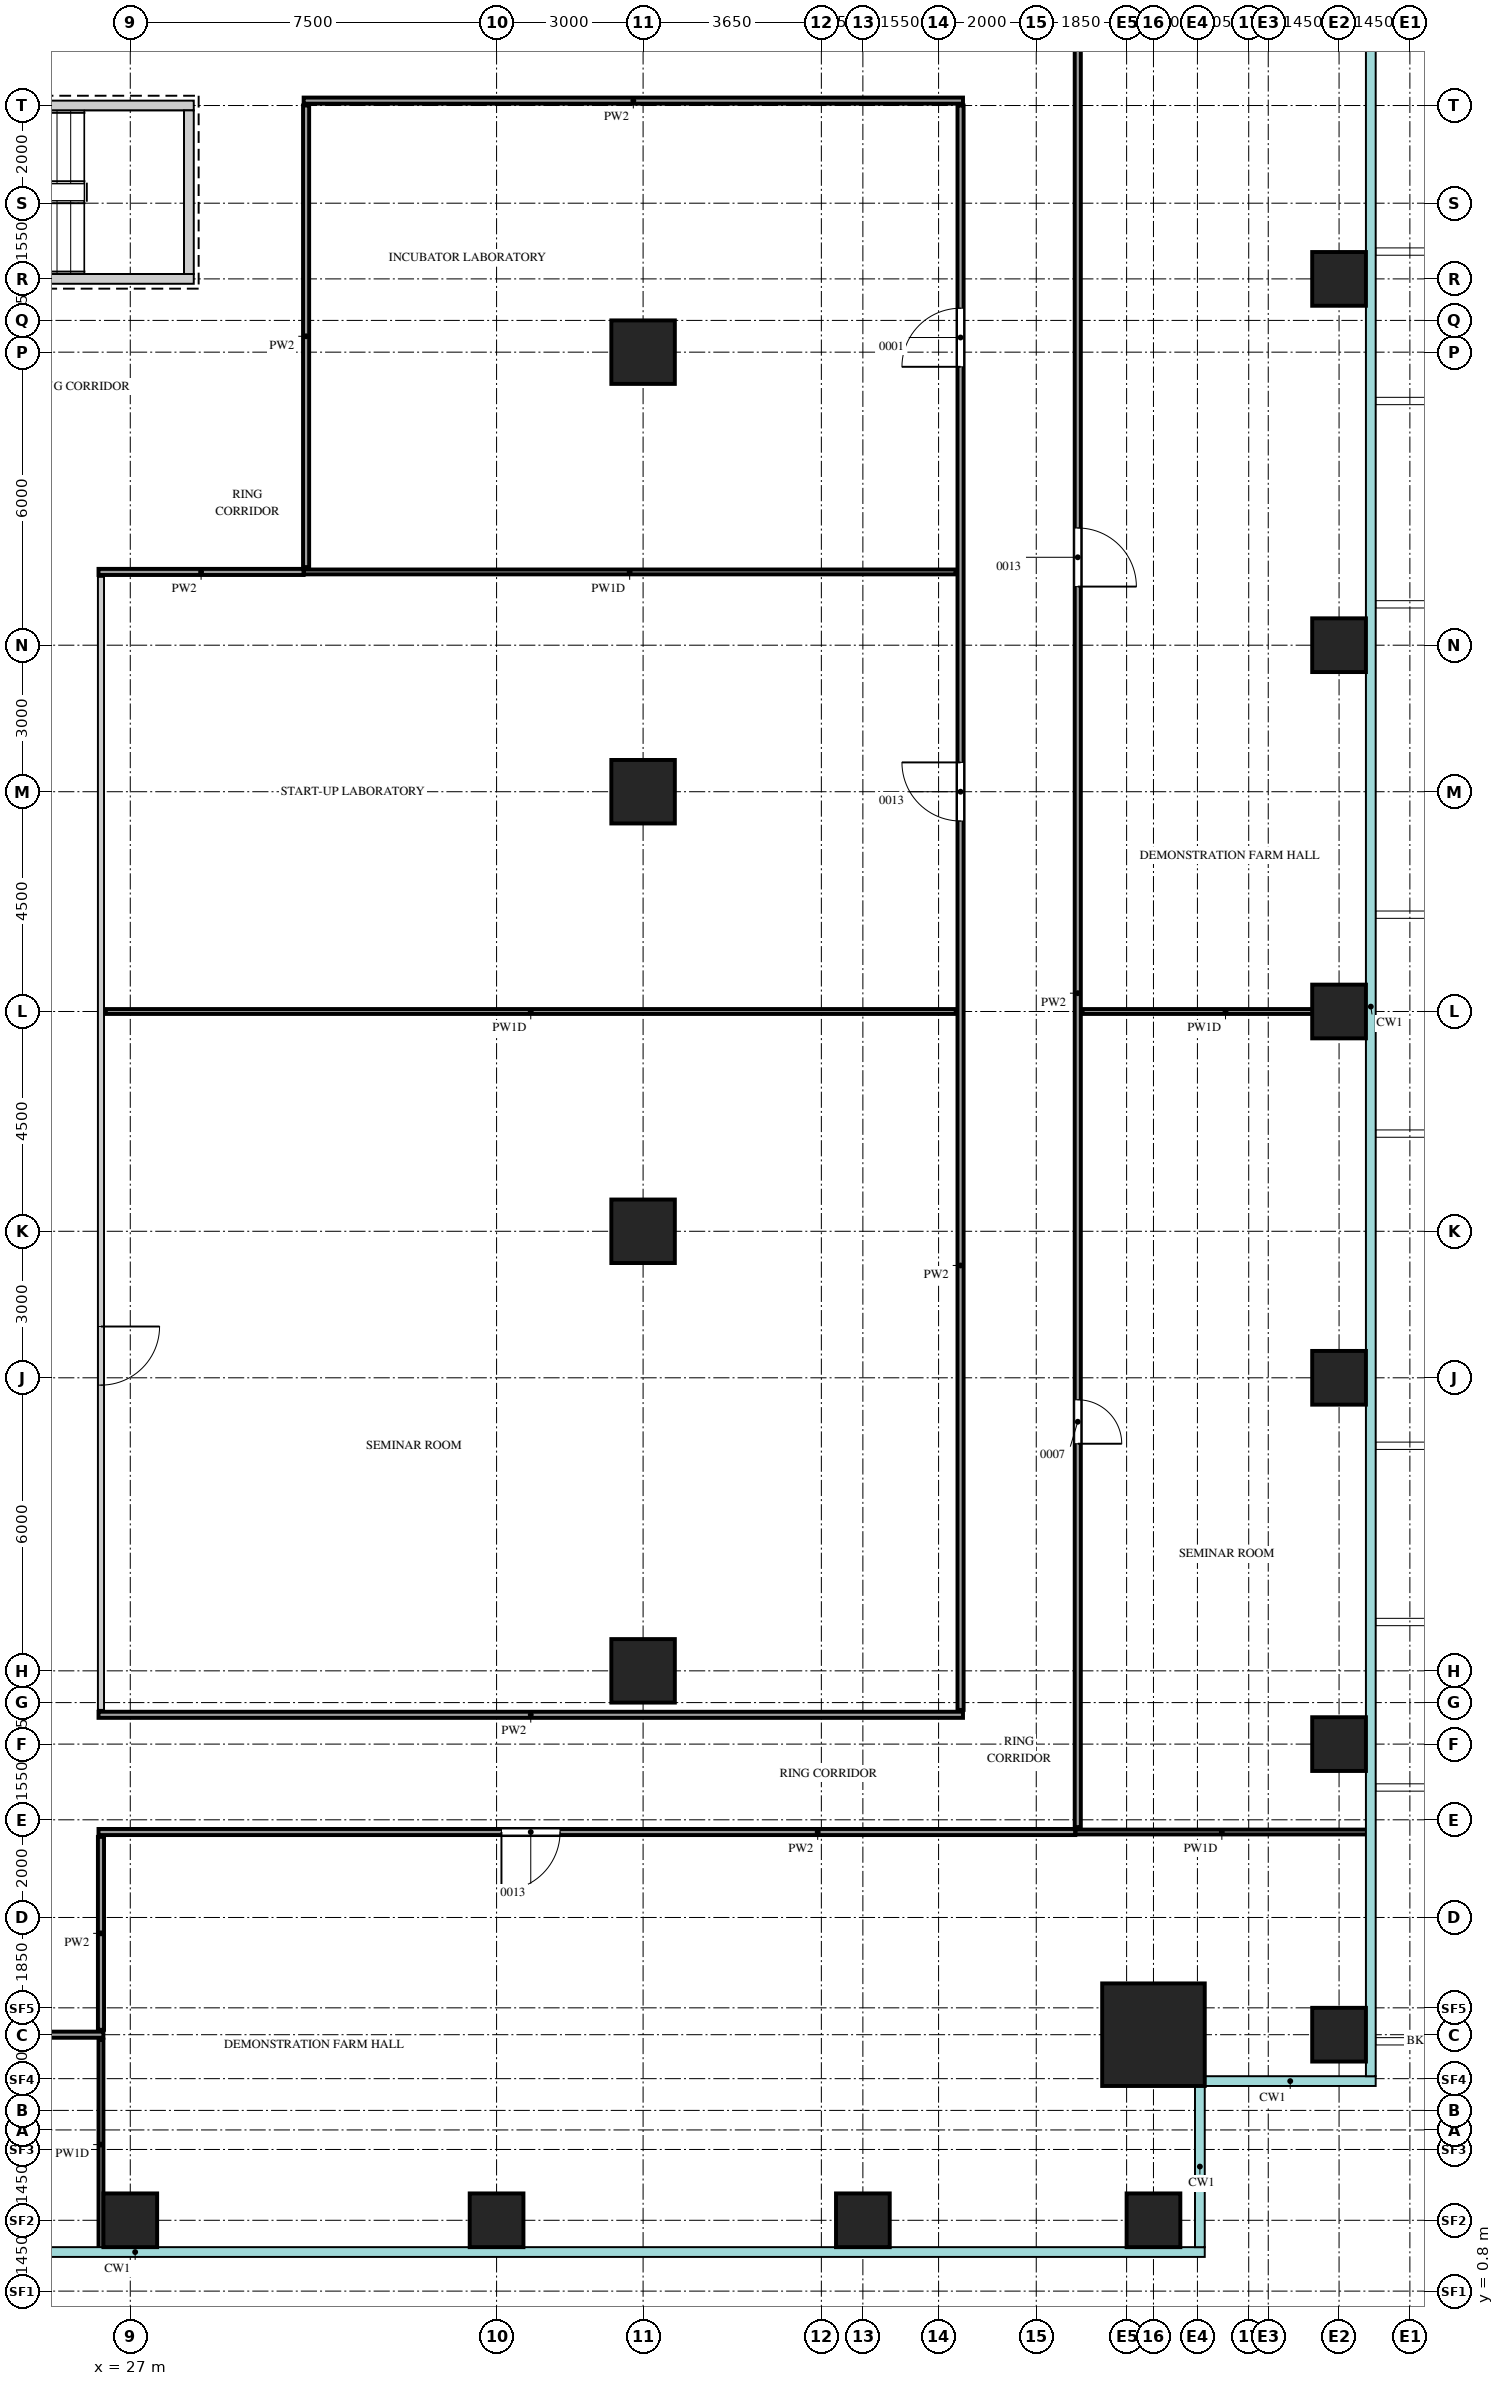
"""IFC4 building model, lengths in metres.
Left out: names, types, materials, properties, quantities, classifications, styles, units other than length and angle.
Written with IfcOpenShell. Run it as: python <this file> out.ifc"""

import sys

from ifc_helpers import new_model, si_unit, direction, frame, frame_2d, origin, origin_2d, place, context, subcontext, project, spatial, rectangle, extrude, source, transform, mapped, element, fill, save


model = new_model("IFC4")
c1 = context("Model", 3, precision=1e-05, world=origin(), true_north=direction((0.0, 1.0)))
c2 = subcontext(c1, "Body", "Model", "MODEL_VIEW")
j1 = project(units=[si_unit("LENGTHUNIT", "METRE"), si_unit("PLANEANGLEUNIT", "RADIAN")], contexts=[c1])
p1 = place(None, origin())
s1 = spatial("IfcSite", under=j1, at=p1, CompositionType="ELEMENT")
p2 = place(p1, origin())
s2 = spatial("IfcBuilding", under=s1, at=p2, CompositionType="ELEMENT")
p3 = place(p2, frame((0.0, 0.0, 149.9)))
s3 = spatial("IfcBuildingStorey", under=s2, at=p3, CompositionType="ELEMENT", Elevation=149.9)
m1 = source(origin(), c2, "Body", "SweptSolid", [
    extrude(rectangle(XDim=7.1, YDim=0.2, at=frame_2d((3.55, 0.0))), origin(), (0.0, 0.0, 1.0), 4.1),
])
p4 = place(p3, frame((21.2, 45.55, 0.0), z_axis=(0.0, 0.0, 1.0), x_axis=(1.0, 0.0, 0.0)))
e1 = element("IfcWall", 1, at=p4, inside=s3, PredefinedType="SHEAR", context=c2, shape_type="MappedRepresentation", body=[
    mapped(m1, transform((0.0, 0.0, 0.0))),
])
m2 = source(origin(), c2, "Body", "SweptSolid", [
    extrude(rectangle(XDim=1.2, YDim=2.1, at=frame_2d((0.6, 1.05))), frame((0.0, 0.11, 0.0), z_axis=(0.0, -1.0, 0.0), x_axis=(1.0, 0.0, 0.0)), (0.0, 0.0, 1.0), 0.22),
])
p5 = place(p4, frame((0.15, 0.0, 0.0)))
e2 = element("IfcOpeningElement", 2, at=p5, cuts=e1, PredefinedType="OPENING", context=c2, shape_type="MappedRepresentation", body=[
    mapped(m2, transform((0.0, 0.0, 0.0))),
])
p6 = place(p3, frame((21.2, 42.0, 0.0), z_axis=(0.0, 0.0, 1.0), x_axis=(1.0, 0.0, 0.0)))
e3 = element("IfcWall", 3, at=p6, inside=s3, PredefinedType="SHEAR", context=c2, shape_type="MappedRepresentation", body=[
    mapped(m1, transform((0.0, 0.0, 0.0))),
])
m3 = source(origin(), c2, "Body", "SweptSolid", [
    extrude(rectangle(XDim=3.35, YDim=0.2, at=frame_2d((1.675, 0.0))), origin(), (0.0, 0.0, 1.0), 4.1),
])
p7 = place(p3, frame((28.2, 42.1, 0.0), z_axis=(0.0, 0.0, 1.0), x_axis=(0.0, 1.0, 0.0)))
e4 = element("IfcWall", 4, at=p7, inside=s3, PredefinedType="SHEAR", context=c2, shape_type="MappedRepresentation", body=[
    mapped(m3, transform((0.0, 0.0, 0.0))),
])
m4 = source(origin(), c2, "Body", "SweptSolid", [
    extrude(rectangle(XDim=2.1, YDim=2.1, at=origin_2d()), origin(), (0.0, 0.0, 1.0), 4.4),
])
p8 = place(p3, frame((47.95, 6.05, 0.0), z_axis=(0.0, 0.0, 1.0), x_axis=(1.0, 0.0, 0.0)))
e5 = element("IfcColumn", 5, at=p8, inside=s3, PredefinedType="COLUMN", context=c2, shape_type="MappedRepresentation", body=[
    mapped(m4, transform((0.0, 0.0, 0.0))),
])
m5 = source(origin(), c2, "Body", "SweptSolid", [
    extrude(rectangle(XDim=1.1, YDim=1.1, at=origin_2d()), origin(), (0.0, 0.0, 1.0), 4.1),
])
for number, where, z_axis, x_axis in (
    (6, (27.0, 2.25, 0.0), (0.0, 0.0, 1.0), (1.0, 0.0, 0.0)),
    (7, (34.5, 2.25, 0.0), (0.0, 0.0, 1.0), (1.0, 0.0, 0.0)),
    (8, (42.0, 2.25, 0.0), (0.0, 0.0, 1.0), (1.0, 0.0, 0.0)),
    (9, (47.95, 2.25, 0.0), (0.0, 0.0, 1.0), (1.0, 0.0, 0.0)),
    (10, (51.75, 6.05, 0.0), (0.0, 0.0, 1.0), (1.0, 0.0, 0.0)),
    (11, (51.75, 12.0, 0.0), (0.0, 0.0, 1.0), (1.0, 0.0, 0.0)),
    (12, (51.75, 19.5, 0.0), (0.0, 0.0, 1.0), (1.0, 0.0, 0.0)),
    (13, (51.75, 27.0, 0.0), (0.0, 0.0, 1.0), (1.0, 0.0, 0.0)),
    (14, (51.75, 34.5, 0.0), (0.0, 0.0, 1.0), (1.0, 0.0, 0.0)),
    (15, (51.75, 42.0, 0.0), (0.0, 0.0, 1.0), (1.0, 0.0, 0.0)),
):
    element("IfcColumn", number, at=place(p3, frame(where, z_axis=z_axis, x_axis=x_axis)), inside=s3, PredefinedType="COLUMN", context=c2, shape_type="MappedRepresentation", body=[
        mapped(m5, transform((0.0, 0.0, 0.0))),
    ])
m6 = source(origin(), c2, "Body", "SweptSolid", [
    extrude(rectangle(XDim=1.3, YDim=1.3, at=origin_2d()), origin(), (0.0, 0.0, 1.0), 4.1),
])
for number, where, z_axis, x_axis in (
    (16, (37.5, 13.5, 0.0), (0.0, 0.0, 1.0), (1.0, 0.0, 0.0)),
    (17, (37.5, 22.5, 0.0), (0.0, 0.0, 1.0), (1.0, 0.0, 0.0)),
    (18, (37.5, 31.5, 0.0), (0.0, 0.0, 1.0), (1.0, 0.0, 0.0)),
    (19, (37.5, 40.5, 0.0), (0.0, 0.0, 1.0), (1.0, 0.0, 0.0)),
):
    element("IfcColumn", number, at=place(p3, frame(where, z_axis=z_axis, x_axis=x_axis)), inside=s3, PredefinedType="COLUMN", context=c2, shape_type="MappedRepresentation", body=[
        mapped(m6, transform((0.0, 0.0, 0.0))),
    ])
m7 = source(origin(), c2, "Body", "SweptSolid", [
    extrude(rectangle(XDim=4.3, YDim=0.1, at=frame_2d((2.15, 0.0))), origin(), (0.0, 0.0, 1.0), 4.2),
])
p9 = place(p3, frame((26.4, 1.65, 0.0), z_axis=(0.0, 0.0, 1.0), x_axis=(0.0, 1.0, 0.0)))
e20 = element("IfcWall", 20, at=p9, inside=s3, PredefinedType="PARTITIONING", context=c2, shape_type="MappedRepresentation", body=[
    mapped(m7, transform((0.0, 0.0, 0.0))),
])
m8 = source(origin(), c2, "Body", "SweptSolid", [
    extrude(rectangle(XDim=22.3, YDim=0.125, at=frame_2d((11.15, 0.0))), origin(), (0.0, 0.0, 1.0), 3.55),
])
p10 = place(p3, frame((4.15, 6.05, 0.0), z_axis=(0.0, 0.0, 1.0), x_axis=(1.0, 0.0, 0.0)))
e21 = element("IfcWall", 21, at=p10, inside=s3, PredefinedType="PARTITIONING", context=c2, shape_type="MappedRepresentation", body=[
    mapped(m8, transform((0.0, 0.0, 0.0))),
])
m9 = source(origin(), c2, "Body", "SweptSolid", [
    extrude(rectangle(XDim=0.9, YDim=2.1, at=frame_2d((0.45, 1.05))), frame((0.0, 0.073, 0.0), z_axis=(0.0, -1.0, 0.0), x_axis=(1.0, 0.0, 0.0)), (0.0, 0.0, 1.0), 0.145),
])
p11 = place(p10, frame((3.5, 0.0, 0.0)))
e22 = element("IfcOpeningElement", 22, at=p11, cuts=e21, PredefinedType="OPENING", context=c2, shape_type="MappedRepresentation", body=[
    mapped(m9, transform((0.0, 0.0, 0.0))),
])
p12 = place(p10, frame((14.6, 0.0, 0.0)))
e23 = element("IfcOpeningElement", 23, at=p12, cuts=e21, PredefinedType="OPENING", context=c2, shape_type="MappedRepresentation", body=[
    mapped(m9, transform((0.0, 0.0, 0.0))),
])
m10 = source(origin(), c2, "Body", "SweptSolid", [
    extrude(rectangle(XDim=3.95, YDim=0.125, at=frame_2d((1.975, 0.0))), origin(), (0.0, 0.0, 1.0), 4.2),
])
p13 = place(p3, frame((26.4, 6.15, 0.0), z_axis=(0.0, 0.0, 1.0), x_axis=(0.0, 1.0, 0.0)))
e24 = element("IfcWall", 24, at=p13, inside=s3, PredefinedType="PARTITIONING", context=c2, shape_type="MappedRepresentation", body=[
    mapped(m10, transform((0.0, 0.0, 0.0))),
])
m11 = source(origin(), c2, "Body", "SweptSolid", [
    extrude(rectangle(XDim=20.0, YDim=0.125, at=frame_2d((10.0, 0.0))), origin(), (0.0, 0.0, 1.0), 4.2),
])
p14 = place(p3, frame((26.35, 10.2, 0.0), z_axis=(0.0, 0.0, 1.0), x_axis=(1.0, 0.0, 0.0)))
e25 = element("IfcWall", 25, at=p14, inside=s3, PredefinedType="PARTITIONING", context=c2, shape_type="MappedRepresentation", body=[
    mapped(m11, transform((0.0, 0.0, 0.0))),
])
m12 = source(origin(), c2, "Body", "SweptSolid", [
    extrude(rectangle(XDim=1.2, YDim=2.1, at=frame_2d((0.6, 1.05))), frame((0.0, 0.073, 0.0), z_axis=(0.0, -1.0, 0.0), x_axis=(1.0, 0.0, 0.0)), (0.0, 0.0, 1.0), 0.145),
])
p15 = place(p14, frame((8.25, 0.0, 0.0)))
e26 = element("IfcOpeningElement", 26, at=p15, cuts=e25, PredefinedType="OPENING", context=c2, shape_type="MappedRepresentation", body=[
    mapped(m12, transform((0.0, 0.0, 0.0))),
])
m13 = source(origin(), c2, "Body", "SweptSolid", [
    extrude(rectangle(XDim=6.0, YDim=0.1, at=frame_2d((3.0, 0.0))), origin(), (0.0, 0.0, 1.0), 4.2),
])
p16 = place(p3, frame((46.35, 10.2, 0.0), z_axis=(0.0, 0.0, 1.0), x_axis=(1.0, 0.0, 0.0)))
e27 = element("IfcWall", 27, at=p16, inside=s3, PredefinedType="PARTITIONING", context=c2, shape_type="MappedRepresentation", body=[
    mapped(m13, transform((0.0, 0.0, 0.0))),
])
m14 = source(origin(), c2, "Body", "SweptSolid", [
    extrude(rectangle(XDim=37.65, YDim=0.125, at=frame_2d((18.825, 0.0))), origin(), (0.0, 0.0, 1.0), 4.2),
])
p17 = place(p3, frame((46.4, 10.3, 0.0), z_axis=(0.0, 0.0, 1.0), x_axis=(0.0, 1.0, 0.0)))
e28 = element("IfcWall", 28, at=p17, inside=s3, PredefinedType="PARTITIONING", context=c2, shape_type="MappedRepresentation", body=[
    mapped(m14, transform((0.0, 0.0, 0.0))),
])
p18 = place(p17, frame((7.85, 0.0, 0.0)))
e29 = element("IfcOpeningElement", 29, at=p18, cuts=e28, PredefinedType="OPENING", context=c2, shape_type="MappedRepresentation", body=[
    mapped(m9, transform((0.0, 0.0, 0.0))),
])
p19 = place(p17, frame((25.4, 0.0, 0.0)))
e30 = element("IfcOpeningElement", 30, at=p19, cuts=e28, PredefinedType="OPENING", context=c2, shape_type="MappedRepresentation", body=[
    mapped(m12, transform((0.0, 0.0, 0.0))),
])
m15 = source(origin(), c2, "Body", "SweptSolid", [
    extrude(rectangle(XDim=17.7, YDim=0.125, at=frame_2d((8.85, 0.0))), origin(), (0.0, 0.0, 1.0), 4.2),
])
p20 = place(p3, frame((26.35, 12.6, 0.0), z_axis=(0.0, 0.0, 1.0), x_axis=(1.0, 0.0, 0.0)))
e31 = element("IfcWall", 31, at=p20, inside=s3, PredefinedType="PARTITIONING", context=c2, shape_type="MappedRepresentation", body=[
    mapped(m15, transform((0.0, 0.0, 0.0))),
])
m16 = source(origin(), c2, "Body", "SweptSolid", [
    extrude(rectangle(XDim=23.2, YDim=0.125, at=frame_2d((11.6, 0.0))), origin(), (0.0, 0.0, 1.0), 4.2),
])
p21 = place(p3, frame((26.4, 12.7, 0.0), z_axis=(0.0, 0.0, 1.0), x_axis=(0.0, 1.0, 0.0)))
e32 = element("IfcWall", 32, at=p21, inside=s3, PredefinedType="PARTITIONING", context=c2, shape_type="MappedRepresentation", body=[
    mapped(m16, transform((0.0, 0.0, 0.0))),
])
p22 = place(p21, frame((6.65, 0.0, 0.0)))
e33 = element("IfcOpeningElement", 33, at=p22, cuts=e32, PredefinedType="OPENING", context=c2, shape_type="MappedRepresentation", body=[
    mapped(m12, transform((0.0, 0.0, 0.0))),
])
m17 = source(origin(), c2, "Body", "SweptSolid", [
    extrude(rectangle(XDim=32.85, YDim=0.125, at=frame_2d((16.425, 0.0))), origin(), (0.0, 0.0, 1.0), 4.2),
])
p23 = place(p3, frame((44.0, 12.7, 0.0), z_axis=(0.0, 0.0, 1.0), x_axis=(0.0, 1.0, 0.0)))
e34 = element("IfcWall", 34, at=p23, inside=s3, PredefinedType="PARTITIONING", context=c2, shape_type="MappedRepresentation", body=[
    mapped(m17, transform((0.0, 0.0, 0.0))),
])
p24 = place(p23, frame((18.2, 0.0, 0.0)))
e35 = element("IfcOpeningElement", 35, at=p24, cuts=e34, PredefinedType="OPENING", context=c2, shape_type="MappedRepresentation", body=[
    mapped(m12, transform((0.0, 0.0, 0.0))),
])
p25 = place(p23, frame((27.5, 0.0, 0.0)))
e36 = element("IfcOpeningElement", 36, at=p25, cuts=e34, PredefinedType="OPENING", context=c2, shape_type="MappedRepresentation", body=[
    mapped(m12, transform((0.0, 0.0, 0.0))),
])
m18 = source(origin(), c2, "Body", "SweptSolid", [
    extrude(rectangle(XDim=17.4, YDim=0.1, at=frame_2d((8.7, 0.0))), origin(), (0.0, 0.0, 1.0), 4.2),
])
p26 = place(p3, frame((26.5, 27.0, 0.0), z_axis=(0.0, 0.0, 1.0), x_axis=(1.0, 0.0, 0.0)))
e37 = element("IfcWall", 37, at=p26, inside=s3, PredefinedType="PARTITIONING", context=c2, shape_type="MappedRepresentation", body=[
    mapped(m18, transform((0.0, 0.0, 0.0))),
])
m19 = source(origin(), c2, "Body", "SweptSolid", [
    extrude(rectangle(XDim=5.85, YDim=0.1, at=frame_2d((2.925, 0.0))), origin(), (0.0, 0.0, 1.0), 4.2),
])
p27 = place(p3, frame((46.5, 27.0, 0.0), z_axis=(0.0, 0.0, 1.0), x_axis=(1.0, 0.0, 0.0)))
e38 = element("IfcWall", 38, at=p27, inside=s3, PredefinedType="PARTITIONING", context=c2, shape_type="MappedRepresentation", body=[
    mapped(m19, transform((0.0, 0.0, 0.0))),
])
m20 = source(origin(), c2, "Body", "SweptSolid", [
    extrude(rectangle(XDim=4.2, YDim=0.125, at=frame_2d((2.1, 0.0))), origin(), (0.0, 0.0, 1.0), 4.2),
])
p28 = place(p3, frame((26.35, 36.0, 0.0), z_axis=(0.0, 0.0, 1.0), x_axis=(1.0, 0.0, 0.0)))
e39 = element("IfcWall", 39, at=p28, inside=s3, PredefinedType="PARTITIONING", context=c2, shape_type="MappedRepresentation", body=[
    mapped(m20, transform((0.0, 0.0, 0.0))),
])
m21 = source(origin(), c2, "Body", "SweptSolid", [
    extrude(rectangle(XDim=13.35, YDim=0.1, at=frame_2d((6.675, 0.0))), origin(), (0.0, 0.0, 1.0), 4.2),
])
p29 = place(p3, frame((30.55, 36.0, 0.0), z_axis=(0.0, 0.0, 1.0), x_axis=(1.0, 0.0, 0.0)))
e40 = element("IfcWall", 40, at=p29, inside=s3, PredefinedType="PARTITIONING", context=c2, shape_type="MappedRepresentation", body=[
    mapped(m21, transform((0.0, 0.0, 0.0))),
])
m22 = source(origin(), c2, "Body", "SweptSolid", [
    extrude(rectangle(XDim=9.45, YDim=0.125, at=frame_2d((4.725, 0.0))), origin(), (0.0, 0.0, 1.0), 4.2),
])
p30 = place(p3, frame((30.6, 36.1, 0.0), z_axis=(0.0, 0.0, 1.0), x_axis=(0.0, 1.0, 0.0)))
e41 = element("IfcWall", 41, at=p30, inside=s3, PredefinedType="PARTITIONING", context=c2, shape_type="MappedRepresentation", body=[
    mapped(m22, transform((0.0, 0.0, 0.0))),
])
m23 = source(origin(), c2, "Body", "SweptSolid", [
    extrude(rectangle(XDim=13.5, YDim=0.125, at=frame_2d((6.75, 0.0))), origin(), (0.0, 0.0, 1.0), 4.2),
])
p31 = place(p3, frame((30.55, 45.65, 0.0), z_axis=(0.0, 0.0, 1.0), x_axis=(1.0, 0.0, 0.0)))
e42 = element("IfcWall", 42, at=p31, inside=s3, PredefinedType="PARTITIONING", context=c2, shape_type="MappedRepresentation", body=[
    mapped(m23, transform((0.0, 0.0, 0.0))),
])
m24 = source(origin(), c2, "Body", "SweptSolid", [
    extrude(rectangle(XDim=1.2, YDim=2.1, at=frame_2d((0.6, 1.05))), frame((0.0, 0.025, 0.0), z_axis=(0.0, -1.0, 0.0), x_axis=(1.0, 0.0, 0.0)), (0.0, 0.0, 1.0), 0.05),
])
p32 = place(p15, origin())
e43 = element("IfcDoor", 43, at=p32, inside=s3, OperationType="SINGLE_SWING_LEFT", PredefinedType="DOOR", context=c2, shape_type="MappedRepresentation", body=[
    mapped(m24, transform((0.0, 0.0, 0.0))),
])
fill(e26, e43)
p33 = place(p22, origin())
e44 = element("IfcDoor", 44, at=p33, inside=s3, OperationType="SINGLE_SWING_RIGHT", PredefinedType="DOOR", context=c2, shape_type="MappedRepresentation", body=[
    mapped(m24, transform((0.0, 0.0, 0.0))),
])
fill(e33, e44)
p34 = place(p24, origin())
e45 = element("IfcDoor", 45, at=p34, inside=s3, OperationType="SINGLE_SWING_LEFT", PredefinedType="DOOR", context=c2, shape_type="MappedRepresentation", body=[
    mapped(m24, transform((0.0, 0.0, 0.0))),
])
fill(e35, e45)
p35 = place(p25, origin())
e46 = element("IfcDoor", 46, at=p35, inside=s3, OperationType="SINGLE_SWING_RIGHT", PredefinedType="DOOR", context=c2, shape_type="MappedRepresentation", body=[
    mapped(m24, transform((0.0, 0.0, 0.0))),
])
fill(e36, e46)
m25 = source(origin(), c2, "Body", "SweptSolid", [
    extrude(rectangle(XDim=0.9, YDim=2.1, at=frame_2d((0.45, 1.05))), frame((0.0, 0.025, 0.0), z_axis=(0.0, -1.0, 0.0), x_axis=(1.0, 0.0, 0.0)), (0.0, 0.0, 1.0), 0.05),
])
p36 = place(p18, origin())
e47 = element("IfcDoor", 47, at=p36, inside=s3, OperationType="SINGLE_SWING_LEFT", PredefinedType="DOOR", context=c2, shape_type="MappedRepresentation", body=[
    mapped(m25, transform((0.0, 0.0, 0.0))),
])
fill(e29, e47)
p37 = place(p19, origin())
e48 = element("IfcDoor", 48, at=p37, inside=s3, OperationType="SINGLE_SWING_LEFT", PredefinedType="DOOR", context=c2, shape_type="MappedRepresentation", body=[
    mapped(m24, transform((0.0, 0.0, 0.0))),
])
fill(e30, e48)
save(model, sys.argv[1])
